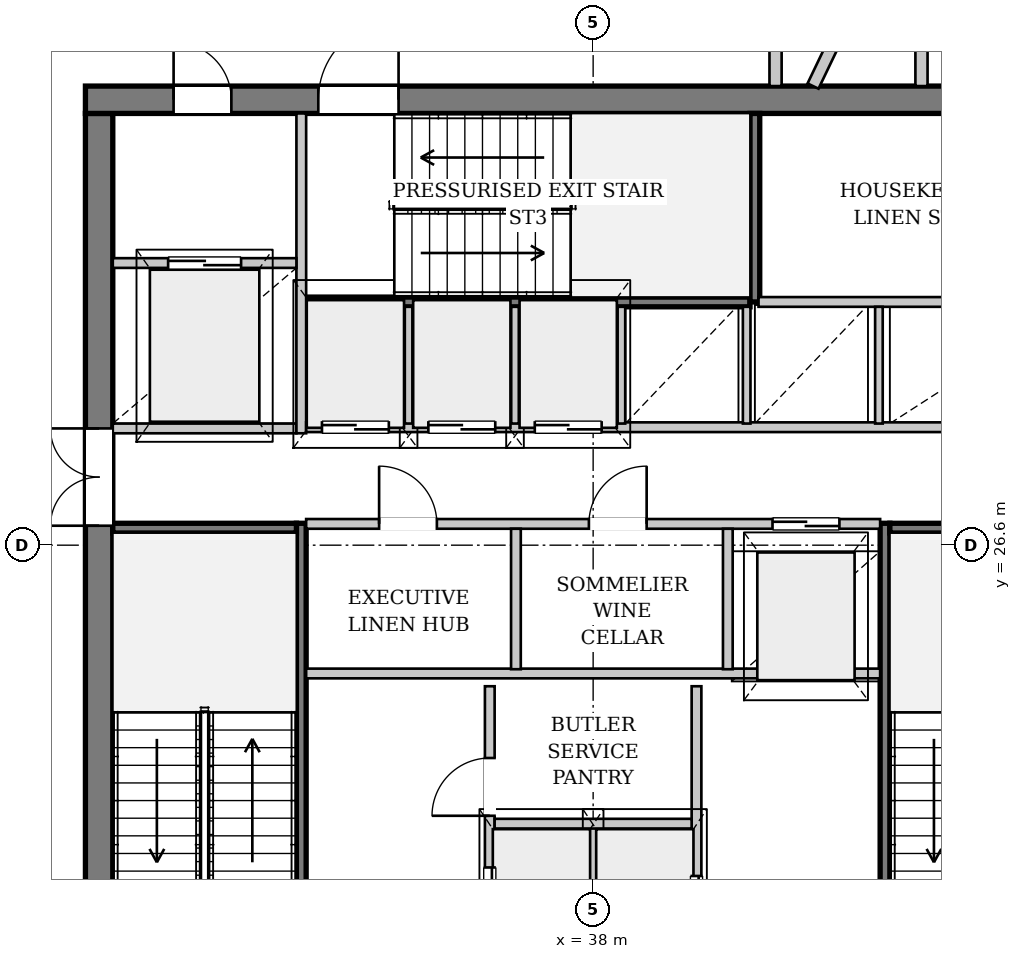
"""IFC4 building model, lengths in metres.
Left out: names, types, materials, properties, quantities, classifications, styles, units other than length and angle.
Written with IfcOpenShell. Run it as: python <this file> out.ifc"""

import sys

from ifc_helpers import new_model, si_unit, direction, frame, frame_2d, origin, place, context, subcontext, project, spatial, rectangle, extrude, source, transform, mapped, element, fill, save


model = new_model("IFC4")
c1 = context("Model", 3, precision=1e-05, world=origin(), true_north=direction((0.0, 1.0)))
c2 = subcontext(c1, "Body", "Model", "MODEL_VIEW")
j1 = project(units=[si_unit("LENGTHUNIT", "METRE"), si_unit("PLANEANGLEUNIT", "RADIAN")], contexts=[c1])
p1 = place(None, origin())
s1 = spatial("IfcSite", under=j1, at=p1, CompositionType="ELEMENT")
p2 = place(p1, origin())
s2 = spatial("IfcBuilding", under=s1, at=p2, CompositionType="ELEMENT")
p3 = place(p2, frame((0.0, 0.0, 241.7)))
s3 = spatial("IfcBuildingStorey", under=s2, at=p3, CompositionType="ELEMENT", Elevation=241.7)
p4 = place(p3, frame((15.555, 29.152, 0.0), z_axis=(0.0, 0.0, 1.0), x_axis=(0.848386889954, 0.52937669476, 0.0)))
e1 = element("IfcWall", 1, at=p4, inside=s3, PredefinedType="SOLIDWALL", context=c2, shape_type="SweptSolid", body=[
    extrude(rectangle(XDim=22.188, YDim=0.38, at=frame_2d((11.094, 0.0))), origin(), (0.0, 0.0, 1.0), 2.872),
])
p5 = place(p4, frame((5.113, 0.0, 0.502)))
e2 = element("IfcOpeningElement", 2, at=p5, cuts=e1, PredefinedType="OPENING", context=c2, shape_type="SweptSolid", body=[
    extrude(rectangle(XDim=2.2, YDim=2.25, at=frame_2d((1.1, 1.125))), frame((0.0, 0.2, 0.0), z_axis=(0.0, -1.0, 0.0), x_axis=(1.0, 0.0, 0.0)), (0.0, 0.0, 1.0), 0.4),
])
p6 = place(p4, frame((14.876, 0.0, 0.502)))
e3 = element("IfcOpeningElement", 3, at=p6, cuts=e1, PredefinedType="OPENING", context=c2, shape_type="SweptSolid", body=[
    extrude(rectangle(XDim=2.2, YDim=2.25, at=frame_2d((1.1, 1.125))), frame((0.0, 0.2, 0.0), z_axis=(0.0, -1.0, 0.0), x_axis=(1.0, 0.0, 0.0)), (0.0, 0.0, 1.0), 0.4),
])
p7 = place(p3, frame((29.875, 19.5, 0.0), z_axis=(0.0, 0.0, 1.0), x_axis=(0.0, 1.0, 0.0)))
e4 = element("IfcWall", 4, at=p7, inside=s3, PredefinedType="SHEAR", context=c2, shape_type="SweptSolid", body=[
    extrude(rectangle(XDim=14.2, YDim=0.45, at=frame_2d((7.1, 0.0))), origin(), (0.0, 0.0, 1.0), 3.38),
])
p8 = place(p7, frame((7.42, 0.0, 0.0)))
e5 = element("IfcOpeningElement", 5, at=p8, cuts=e4, PredefinedType="OPENING", context=c2, shape_type="SweptSolid", body=[
    extrude(rectangle(XDim=1.6, YDim=2.2, at=frame_2d((0.8, 1.1))), frame((0.0, 0.235, 0.0), z_axis=(0.0, -1.0, 0.0), x_axis=(1.0, 0.0, 0.0)), (0.0, 0.0, 1.0), 0.47),
])
p9 = place(p3, frame((29.65, 33.925, 0.0), z_axis=(0.0, 0.0, 1.0), x_axis=(1.0, 0.0, 0.0)))
e6 = element("IfcWall", 6, at=p9, inside=s3, PredefinedType="SHEAR", context=c2, shape_type="SweptSolid", body=[
    extrude(rectangle(XDim=16.7, YDim=0.45, at=frame_2d((8.35, 0.0))), origin(), (0.0, 0.0, 1.0), 3.38),
])
p10 = place(p9, frame((1.45, 0.0, 0.0)))
e7 = element("IfcOpeningElement", 7, at=p10, cuts=e6, PredefinedType="OPENING", context=c2, shape_type="SweptSolid", body=[
    extrude(rectangle(XDim=0.95, YDim=2.1, at=frame_2d((0.475, 1.05))), frame((0.0, 0.235, 0.0), z_axis=(0.0, -1.0, 0.0), x_axis=(1.0, 0.0, 0.0)), (0.0, 0.0, 1.0), 0.47),
])
p11 = place(p9, frame((3.83, 0.0, 0.0)))
e8 = element("IfcOpeningElement", 8, at=p11, cuts=e6, PredefinedType="OPENING", context=c2, shape_type="SweptSolid", body=[
    extrude(rectangle(XDim=1.32, YDim=2.2, at=frame_2d((0.66, 1.1))), frame((0.0, 0.235, 0.0), z_axis=(0.0, -1.0, 0.0), x_axis=(1.0, 0.0, 0.0)), (0.0, 0.0, 1.0), 0.47),
])
p12 = place(p3, frame((33.2, 19.5, 0.0), z_axis=(0.0, 0.0, 1.0), x_axis=(0.0, 1.0, 0.0)))
e9 = element("IfcWall", 9, at=p12, inside=s3, PredefinedType="PARTITIONING", context=c2, shape_type="SweptSolid", body=[
    extrude(rectangle(XDim=7.46, YDim=0.16, at=frame_2d((3.73, 0.0))), origin(), (0.0, 0.0, 1.0), 3.38),
])
p13 = place(p12, frame((0.08, 0.0, 0.0)))
e10 = element("IfcOpeningElement", 10, at=p13, cuts=e9, PredefinedType="OPENING", context=c2, shape_type="SweptSolid", body=[
    extrude(rectangle(XDim=1.32, YDim=2.2, at=frame_2d((0.66, 1.1))), frame((0.0, 0.09, 0.0), z_axis=(0.0, -1.0, 0.0), x_axis=(1.0, 0.0, 0.0)), (0.0, 0.0, 1.0), 0.18),
])
p14 = place(p3, frame((30.1, 26.88, 0.0), z_axis=(0.0, 0.0, 1.0), x_axis=(1.0, 0.0, 0.0)))
e11 = element("IfcWall", 11, at=p14, inside=s3, PredefinedType="PARTITIONING", context=c2, shape_type="SweptSolid", body=[
    extrude(rectangle(XDim=3.02, YDim=0.16, at=frame_2d((1.51, 0.0))), origin(), (0.0, 0.0, 1.0), 3.38),
])
p15 = place(p3, frame((42.8, 26.96, 0.0), z_axis=(0.0, 0.0, 1.0), x_axis=(0.0, -1.0, 0.0)))
e12 = element("IfcWall", 12, at=p15, inside=s3, PredefinedType="PARTITIONING", context=c2, shape_type="SweptSolid", body=[
    extrude(rectangle(XDim=7.46, YDim=0.16, at=frame_2d((3.73, 0.0))), origin(), (0.0, 0.0, 1.0), 3.38),
])
p16 = place(p15, frame((6.06, 0.0, 0.0)))
e13 = element("IfcOpeningElement", 13, at=p16, cuts=e12, PredefinedType="OPENING", context=c2, shape_type="SweptSolid", body=[
    extrude(rectangle(XDim=1.32, YDim=2.2, at=frame_2d((0.66, 1.1))), frame((0.0, 0.09, 0.0), z_axis=(0.0, -1.0, 0.0), x_axis=(1.0, 0.0, 0.0)), (0.0, 0.0, 1.0), 0.18),
])
p17 = place(p3, frame((42.88, 26.88, 0.0), z_axis=(0.0, 0.0, 1.0), x_axis=(1.0, 0.0, 0.0)))
e14 = element("IfcWall", 14, at=p17, inside=s3, PredefinedType="PARTITIONING", context=c2, shape_type="SweptSolid", body=[
    extrude(rectangle(XDim=3.02, YDim=0.16, at=frame_2d((1.51, 0.0))), origin(), (0.0, 0.0, 1.0), 3.38),
])
p18 = place(p3, frame((33.28, 30.6, 0.0), z_axis=(0.0, 0.0, 1.0), x_axis=(1.0, 0.0, 0.0)))
e15 = element("IfcWall", 15, at=p18, inside=s3, PredefinedType="PARTITIONING", context=c2, shape_type="SweptSolid", body=[
    extrude(rectangle(XDim=7.3, YDim=0.16, at=frame_2d((3.65, 0.0))), origin(), (0.0, 0.0, 1.0), 3.38),
])
p19 = place(p3, frame((40.66, 30.6, 0.0), z_axis=(0.0, 0.0, 1.0), x_axis=(0.0, 1.0, 0.0)))
e16 = element("IfcWall", 16, at=p19, inside=s3, PredefinedType="PARTITIONING", context=c2, shape_type="SweptSolid", body=[
    extrude(rectangle(XDim=3.1, YDim=0.16, at=frame_2d((1.55, 0.0))), origin(), (0.0, 0.0, 1.0), 3.38),
])
p20 = place(p3, frame((36.3, 19.5, 0.0), z_axis=(0.0, 0.0, 1.0), x_axis=(0.0, 1.0, 0.0)))
e17 = element("IfcWall", 17, at=p20, inside=s3, PredefinedType="PARTITIONING", context=c2, shape_type="SweptSolid", body=[
    extrude(rectangle(XDim=4.78, YDim=0.16, at=frame_2d((2.39, 0.0))), origin(), (0.0, 0.0, 1.0), 3.38),
])
p21 = place(p20, frame((0.6, 0.0, 0.0)))
e18 = element("IfcOpeningElement", 18, at=p21, cuts=e17, PredefinedType="OPENING", context=c2, shape_type="SweptSolid", body=[
    extrude(rectangle(XDim=1.2, YDim=2.2, at=frame_2d((0.6, 1.1))), frame((0.0, 0.09, 0.0), z_axis=(0.0, -1.0, 0.0), x_axis=(1.0, 0.0, 0.0)), (0.0, 0.0, 1.0), 0.18),
])
p22 = place(p20, frame((2.65, 0.0, 0.0)))
e19 = element("IfcOpeningElement", 19, at=p22, cuts=e17, PredefinedType="OPENING", context=c2, shape_type="SweptSolid", body=[
    extrude(rectangle(XDim=0.95, YDim=2.1, at=frame_2d((0.475, 1.05))), frame((0.0, 0.09, 0.0), z_axis=(0.0, -1.0, 0.0), x_axis=(1.0, 0.0, 0.0)), (0.0, 0.0, 1.0), 0.18),
])
p23 = place(p3, frame((39.7, 24.28, 0.0), z_axis=(0.0, 0.0, 1.0), x_axis=(0.0, -1.0, 0.0)))
e20 = element("IfcWall", 20, at=p23, inside=s3, PredefinedType="PARTITIONING", context=c2, shape_type="SweptSolid", body=[
    extrude(rectangle(XDim=4.78, YDim=0.16, at=frame_2d((2.39, 0.0))), origin(), (0.0, 0.0, 1.0), 3.38),
])
p24 = place(p23, frame((3.12, 0.0, 0.0)))
e21 = element("IfcOpeningElement", 21, at=p24, cuts=e20, PredefinedType="OPENING", context=c2, shape_type="SweptSolid", body=[
    extrude(rectangle(XDim=1.2, YDim=2.2, at=frame_2d((0.6, 1.1))), frame((0.0, 0.09, 0.0), z_axis=(0.0, -1.0, 0.0), x_axis=(1.0, 0.0, 0.0)), (0.0, 0.0, 1.0), 0.18),
])
p25 = place(p3, frame((38.0, 19.5, 0.0), z_axis=(0.0, 0.0, 1.0), x_axis=(0.0, 1.0, 0.0)))
e22 = element("IfcWall", 22, at=p25, inside=s3, PredefinedType="PARTITIONING", context=c2, shape_type="SweptSolid", body=[
    extrude(rectangle(XDim=2.46, YDim=0.125, at=frame_2d((1.23, 0.0))), origin(), (0.0, 0.0, 1.0), 3.38),
])
p26 = place(p3, frame((36.38, 22.02, 0.0), z_axis=(0.0, 0.0, 1.0), x_axis=(1.0, 0.0, 0.0)))
e23 = element("IfcWall", 23, at=p26, inside=s3, PredefinedType="PARTITIONING", context=c2, shape_type="SweptSolid", body=[
    extrude(rectangle(XDim=3.24, YDim=0.16, at=frame_2d((1.62, 0.0))), origin(), (0.0, 0.0, 1.0), 3.38),
])
p27 = place(p3, frame((33.28, 24.49, 0.0), z_axis=(0.0, 0.0, 1.0), x_axis=(1.0, 0.0, 0.0)))
e24 = element("IfcWall", 24, at=p27, inside=s3, PredefinedType="PARTITIONING", context=c2, shape_type="SweptSolid", body=[
    extrude(rectangle(XDim=9.44, YDim=0.16, at=frame_2d((4.72, 0.0))), origin(), (0.0, 0.0, 1.0), 3.38),
])
p28 = place(p3, frame((30.1, 28.52, 0.0), z_axis=(0.0, 0.0, 1.0), x_axis=(1.0, 0.0, 0.0)))
e25 = element("IfcWall", 25, at=p28, inside=s3, PredefinedType="PARTITIONING", context=c2, shape_type="SweptSolid", body=[
    extrude(rectangle(XDim=3.02, YDim=0.16, at=frame_2d((1.51, 0.0))), origin(), (0.0, 0.0, 1.0), 3.38),
])
p29 = place(p3, frame((33.2, 28.44, 0.0), z_axis=(0.0, 0.0, 1.0), x_axis=(0.0, 1.0, 0.0)))
e26 = element("IfcWall", 26, at=p29, inside=s3, PredefinedType="PARTITIONING", context=c2, shape_type="SweptSolid", body=[
    extrude(rectangle(XDim=5.26, YDim=0.16, at=frame_2d((2.63, 0.0))), origin(), (0.0, 0.0, 1.0), 3.38),
])
p30 = place(p3, frame((30.1, 31.24, 0.0), z_axis=(0.0, 0.0, 1.0), x_axis=(1.0, 0.0, 0.0)))
e27 = element("IfcWall", 27, at=p30, inside=s3, PredefinedType="PARTITIONING", context=c2, shape_type="SweptSolid", body=[
    extrude(rectangle(XDim=3.02, YDim=0.16, at=frame_2d((1.51, 0.0))), origin(), (0.0, 0.0, 1.0), 3.38),
])
p31 = place(p30, frame((0.91, 0.0, 0.0)))
e28 = element("IfcOpeningElement", 28, at=p31, cuts=e27, PredefinedType="OPENING", context=c2, shape_type="SweptSolid", body=[
    extrude(rectangle(XDim=1.2, YDim=2.2, at=frame_2d((0.6, 1.1))), frame((0.0, 0.09, 0.0), z_axis=(0.0, -1.0, 0.0), x_axis=(1.0, 0.0, 0.0)), (0.0, 0.0, 1.0), 0.18),
])
p32 = place(p3, frame((33.28, 26.95, 0.0), z_axis=(0.0, 0.0, 1.0), x_axis=(1.0, 0.0, 0.0)))
e29 = element("IfcWall", 29, at=p32, inside=s3, PredefinedType="PARTITIONING", context=c2, shape_type="SweptSolid", body=[
    extrude(rectangle(XDim=9.44, YDim=0.16, at=frame_2d((4.72, 0.0))), origin(), (0.0, 0.0, 1.0), 3.38),
])
p33 = place(p32, frame((1.2, 0.0, 0.0)))
e30 = element("IfcOpeningElement", 30, at=p33, cuts=e29, PredefinedType="OPENING", context=c2, shape_type="SweptSolid", body=[
    extrude(rectangle(XDim=0.95, YDim=2.1, at=frame_2d((0.475, 1.05))), frame((0.0, 0.09, 0.0), z_axis=(0.0, -1.0, 0.0), x_axis=(1.0, 0.0, 0.0)), (0.0, 0.0, 1.0), 0.18),
])
p34 = place(p32, frame((4.65, 0.0, 0.0)))
e31 = element("IfcOpeningElement", 31, at=p34, cuts=e29, PredefinedType="OPENING", context=c2, shape_type="SweptSolid", body=[
    extrude(rectangle(XDim=0.95, YDim=2.1, at=frame_2d((0.475, 1.05))), frame((0.0, 0.09, 0.0), z_axis=(0.0, -1.0, 0.0), x_axis=(1.0, 0.0, 0.0)), (0.0, 0.0, 1.0), 0.18),
])
p35 = place(p32, frame((7.67, 0.0, 0.0)))
e32 = element("IfcOpeningElement", 32, at=p35, cuts=e29, PredefinedType="OPENING", context=c2, shape_type="SweptSolid", body=[
    extrude(rectangle(XDim=1.1, YDim=2.2, at=frame_2d((0.55, 1.1))), frame((0.0, 0.09, 0.0), z_axis=(0.0, -1.0, 0.0), x_axis=(1.0, 0.0, 0.0)), (0.0, 0.0, 1.0), 0.18),
])
for number, where, z_axis, x_axis in (
    (33, (36.73, 24.56, 0.0), (0.0, 0.0, 1.0), (0.0, 1.0, 0.0)),
    (34, (40.215, 24.56, 0.0), (0.0, 0.0, 1.0), (0.0, 1.0, 0.0)),
):
    element("IfcWall", number, at=place(p3, frame(where, z_axis=z_axis, x_axis=x_axis)), inside=s3, PredefinedType="PARTITIONING", context=c2, shape_type="SweptSolid", body=[
        extrude(rectangle(XDim=2.31, YDim=0.16, at=frame_2d((1.155, 0.0))), origin(), (0.0, 0.0, 1.0), 3.38),
    ])
p36 = place(p3, frame((33.28, 28.54, 0.0), z_axis=(0.0, 0.0, 1.0), x_axis=(1.0, 0.0, 0.0)))
e35 = element("IfcWall", 35, at=p36, inside=s3, PredefinedType="PARTITIONING", context=c2, shape_type="SweptSolid", body=[
    extrude(rectangle(XDim=12.62, YDim=0.16, at=frame_2d((6.31, 0.0))), origin(), (0.0, 0.0, 1.0), 3.38),
])
p37 = place(p36, frame((0.26, 0.0, 0.0)))
e36 = element("IfcOpeningElement", 36, at=p37, cuts=e35, PredefinedType="OPENING", context=c2, shape_type="SweptSolid", body=[
    extrude(rectangle(XDim=1.1, YDim=2.2, at=frame_2d((0.55, 1.1))), frame((0.0, 0.09, 0.0), z_axis=(0.0, -1.0, 0.0), x_axis=(1.0, 0.0, 0.0)), (0.0, 0.0, 1.0), 0.18),
])
p38 = place(p36, frame((2.01, 0.0, 0.0)))
e37 = element("IfcOpeningElement", 37, at=p38, cuts=e35, PredefinedType="OPENING", context=c2, shape_type="SweptSolid", body=[
    extrude(rectangle(XDim=1.1, YDim=2.2, at=frame_2d((0.55, 1.1))), frame((0.0, 0.09, 0.0), z_axis=(0.0, -1.0, 0.0), x_axis=(1.0, 0.0, 0.0)), (0.0, 0.0, 1.0), 0.18),
])
p39 = place(p36, frame((3.76, 0.0, 0.0)))
e38 = element("IfcOpeningElement", 38, at=p39, cuts=e35, PredefinedType="OPENING", context=c2, shape_type="SweptSolid", body=[
    extrude(rectangle(XDim=1.1, YDim=2.2, at=frame_2d((0.55, 1.1))), frame((0.0, 0.09, 0.0), z_axis=(0.0, -1.0, 0.0), x_axis=(1.0, 0.0, 0.0)), (0.0, 0.0, 1.0), 0.18),
])
p40 = place(p3, frame((40.72, 30.6, 0.0), z_axis=(0.0, 0.0, 1.0), x_axis=(1.0, 0.0, 0.0)))
e39 = element("IfcWall", 39, at=p40, inside=s3, PredefinedType="PARTITIONING", context=c2, shape_type="SweptSolid", body=[
    extrude(rectangle(XDim=5.18, YDim=0.16, at=frame_2d((2.59, 0.0))), origin(), (0.0, 0.0, 1.0), 3.38),
])
for number, where, z_axis, x_axis in (
    (40, (34.965, 28.6, 0.0), (0.0, 0.0, 1.0), (0.0, 1.0, 0.0)),
    (41, (36.715, 28.6, 0.0), (0.0, 0.0, 1.0), (0.0, 1.0, 0.0)),
    (42, (38.465, 28.6, 0.0), (0.0, 0.0, 1.0), (0.0, 1.0, 0.0)),
    (43, (40.525, 28.6, 0.0), (0.0, 0.0, 1.0), (0.0, 1.0, 0.0)),
    (44, (42.7, 28.6, 0.0), (0.0, 0.0, 1.0), (0.0, 1.0, 0.0)),
):
    element("IfcWall", number, at=place(p3, frame(where, z_axis=z_axis, x_axis=x_axis)), inside=s3, PredefinedType="PARTITIONING", context=c2, shape_type="SweptSolid", body=[
        extrude(rectangle(XDim=1.92, YDim=0.125, at=frame_2d((0.96, 0.0))), origin(), (0.0, 0.0, 1.0), 3.38),
    ])
p41 = place(p3, frame((41.616, 34.15, 0.0), z_axis=(0.0, 0.0, 1.0), x_axis=(0.43198071356, 0.90188284334, 0.0)))
e45 = element("IfcWall", 45, at=p41, inside=s3, PredefinedType="PARTITIONING", context=c2, shape_type="SweptSolid", body=[
    extrude(rectangle(XDim=13.436, YDim=0.2, at=frame_2d((6.718, 0.0))), origin(), (0.0, 0.0, 1.0), 3.38),
])
for number, where, z_axis, x_axis in (
    (46, (41.0, 34.15, 0.0), (0.0, 0.0, 1.0), (0.0, 1.0, 0.0)),
    (47, (43.4, 34.15, 0.0), (0.0, 0.0, 1.0), (0.0, 1.0, 0.0)),
):
    element("IfcWall", number, at=place(p3, frame(where, z_axis=z_axis, x_axis=x_axis)), inside=s3, PredefinedType="PARTITIONING", context=c2, shape_type="SweptSolid", body=[
        extrude(rectangle(XDim=1.85, YDim=0.2, at=frame_2d((0.925, 0.0))), origin(), (0.0, 0.0, 1.0), 3.38),
    ])
m1 = source(origin(), c2, "Body", "SweptSolid", [
    extrude(rectangle(XDim=1.6, YDim=2.2, at=frame_2d((0.8, 1.1))), frame((0.0, 0.025, 0.0), z_axis=(0.0, -1.0, 0.0), x_axis=(1.0, 0.0, 0.0)), (0.0, 0.0, 1.0), 0.05),
])
p42 = place(p8, origin())
e48 = element("IfcDoor", 48, at=p42, inside=s3, OperationType="DOUBLE_DOOR_SINGLE_SWING", PredefinedType="DOOR", context=c2, shape_type="MappedRepresentation", body=[
    mapped(m1, transform((0.0, 0.0, 0.0), x_axis=(1.0, 0.0, 0.0), y_axis=(0.0, 1.0, 0.0), z_axis=(0.0, 0.0, 1.0), scale=1.0)),
])
fill(e5, e48)
m2 = source(origin(), c2, "Body", "SweptSolid", [
    extrude(rectangle(XDim=0.95, YDim=2.1, at=frame_2d((0.475, 1.05))), frame((0.0, 0.025, 0.0), z_axis=(0.0, -1.0, 0.0), x_axis=(1.0, 0.0, 0.0)), (0.0, 0.0, 1.0), 0.05),
])
p43 = place(p10, origin())
e49 = element("IfcDoor", 49, at=p43, inside=s3, OperationType="SINGLE_SWING_LEFT", PredefinedType="DOOR", context=c2, shape_type="MappedRepresentation", body=[
    mapped(m2, transform((0.0, 0.0, 0.0), x_axis=(1.0, 0.0, 0.0), y_axis=(0.0, 1.0, 0.0), z_axis=(0.0, 0.0, 1.0), scale=1.0)),
])
fill(e7, e49)
m3 = source(origin(), c2, "Body", "SweptSolid", [
    extrude(rectangle(XDim=1.32, YDim=2.2, at=frame_2d((0.66, 1.1))), frame((0.0, 0.025, 0.0), z_axis=(0.0, -1.0, 0.0), x_axis=(1.0, 0.0, 0.0)), (0.0, 0.0, 1.0), 0.05),
])
p44 = place(p11, origin())
e50 = element("IfcDoor", 50, at=p44, inside=s3, OperationType="SINGLE_SWING_RIGHT", PredefinedType="DOOR", context=c2, shape_type="MappedRepresentation", body=[
    mapped(m3, transform((0.0, 0.0, 0.0), x_axis=(1.0, 0.0, 0.0), y_axis=(0.0, 1.0, 0.0), z_axis=(0.0, 0.0, 1.0), scale=1.0)),
])
fill(e8, e50)
m4 = source(origin(), c2, "Body", "SweptSolid", [
    extrude(rectangle(XDim=1.2, YDim=2.2, at=frame_2d((0.6, 1.1))), frame((0.0, 0.025, 0.0), z_axis=(0.0, -1.0, 0.0), x_axis=(1.0, 0.0, 0.0)), (0.0, 0.0, 1.0), 0.05),
])
p45 = place(p21, origin())
e51 = element("IfcDoor", 51, at=p45, inside=s3, OperationType="DOUBLE_DOOR_SLIDING", PredefinedType="DOOR", context=c2, shape_type="MappedRepresentation", body=[
    mapped(m4, transform((0.0, 0.0, 0.0), x_axis=(1.0, 0.0, 0.0), y_axis=(0.0, 1.0, 0.0), z_axis=(0.0, 0.0, 1.0), scale=1.0)),
])
fill(e18, e51)
p46 = place(p22, origin())
e52 = element("IfcDoor", 52, at=p46, inside=s3, OperationType="SINGLE_SWING_LEFT", PredefinedType="DOOR", context=c2, shape_type="MappedRepresentation", body=[
    mapped(m2, transform((0.0, 0.0, 0.0), x_axis=(1.0, 0.0, 0.0), y_axis=(0.0, 1.0, 0.0), z_axis=(0.0, 0.0, 1.0), scale=1.0)),
])
fill(e19, e52)
p47 = place(p24, origin())
e53 = element("IfcDoor", 53, at=p47, inside=s3, OperationType="DOUBLE_DOOR_SLIDING", PredefinedType="DOOR", context=c2, shape_type="MappedRepresentation", body=[
    mapped(m4, transform((0.0, 0.0, 0.0), x_axis=(1.0, 0.0, 0.0), y_axis=(0.0, 1.0, 0.0), z_axis=(0.0, 0.0, 1.0), scale=1.0)),
])
fill(e21, e53)
p48 = place(p31, origin())
e54 = element("IfcDoor", 54, at=p48, inside=s3, OperationType="DOUBLE_DOOR_SLIDING", PredefinedType="DOOR", context=c2, shape_type="MappedRepresentation", body=[
    mapped(m4, transform((0.0, 0.0, 0.0), x_axis=(1.0, 0.0, 0.0), y_axis=(0.0, 1.0, 0.0), z_axis=(0.0, 0.0, 1.0), scale=1.0)),
])
fill(e28, e54)
p49 = place(p33, origin())
e55 = element("IfcDoor", 55, at=p49, inside=s3, OperationType="SINGLE_SWING_LEFT", PredefinedType="DOOR", context=c2, shape_type="MappedRepresentation", body=[
    mapped(m2, transform((0.0, 0.0, 0.0), x_axis=(1.0, 0.0, 0.0), y_axis=(0.0, 1.0, 0.0), z_axis=(0.0, 0.0, 1.0), scale=1.0)),
])
fill(e30, e55)
p50 = place(p34, origin())
e56 = element("IfcDoor", 56, at=p50, inside=s3, OperationType="SINGLE_SWING_RIGHT", PredefinedType="DOOR", context=c2, shape_type="MappedRepresentation", body=[
    mapped(m2, transform((0.0, 0.0, 0.0), x_axis=(1.0, 0.0, 0.0), y_axis=(0.0, 1.0, 0.0), z_axis=(0.0, 0.0, 1.0), scale=1.0)),
])
fill(e31, e56)
m5 = source(origin(), c2, "Body", "SweptSolid", [
    extrude(rectangle(XDim=1.1, YDim=2.2, at=frame_2d((0.55, 1.1))), frame((0.0, 0.025, 0.0), z_axis=(0.0, -1.0, 0.0), x_axis=(1.0, 0.0, 0.0)), (0.0, 0.0, 1.0), 0.05),
])
p51 = place(p35, origin())
e57 = element("IfcDoor", 57, at=p51, inside=s3, OperationType="DOUBLE_DOOR_SLIDING", PredefinedType="DOOR", context=c2, shape_type="MappedRepresentation", body=[
    mapped(m5, transform((0.0, 0.0, 0.0), x_axis=(1.0, 0.0, 0.0), y_axis=(0.0, 1.0, 0.0), z_axis=(0.0, 0.0, 1.0), scale=1.0)),
])
fill(e32, e57)
p52 = place(p37, origin())
e58 = element("IfcDoor", 58, at=p52, inside=s3, OperationType="DOUBLE_DOOR_SLIDING", PredefinedType="DOOR", context=c2, shape_type="MappedRepresentation", body=[
    mapped(m5, transform((0.0, 0.0, 0.0), x_axis=(1.0, 0.0, 0.0), y_axis=(0.0, 1.0, 0.0), z_axis=(0.0, 0.0, 1.0), scale=1.0)),
])
fill(e36, e58)
p53 = place(p38, origin())
e59 = element("IfcDoor", 59, at=p53, inside=s3, OperationType="DOUBLE_DOOR_SLIDING", PredefinedType="DOOR", context=c2, shape_type="MappedRepresentation", body=[
    mapped(m5, transform((0.0, 0.0, 0.0), x_axis=(1.0, 0.0, 0.0), y_axis=(0.0, 1.0, 0.0), z_axis=(0.0, 0.0, 1.0), scale=1.0)),
])
fill(e37, e59)
p54 = place(p39, origin())
e60 = element("IfcDoor", 60, at=p54, inside=s3, OperationType="DOUBLE_DOOR_SLIDING", PredefinedType="DOOR", context=c2, shape_type="MappedRepresentation", body=[
    mapped(m5, transform((0.0, 0.0, 0.0), x_axis=(1.0, 0.0, 0.0), y_axis=(0.0, 1.0, 0.0), z_axis=(0.0, 0.0, 1.0), scale=1.0)),
])
fill(e38, e60)
save(model, sys.argv[1])
